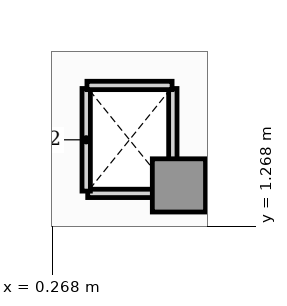
"""IFC4 building model, lengths in metres.
Left out: names, types, materials, properties, quantities, classifications, styles, units other than length and angle.
Written with IfcOpenShell. Run it as: python <this file> out.ifc"""

import sys

from ifc_helpers import new_model, si_unit, direction, frame, frame_2d, origin, origin_2d, place, context, subcontext, project, spatial, rectangle, hollow_rectangle, extrude, element, save


model = new_model("IFC4")
c1 = context("Model", 3, precision=1e-05, world=origin(), true_north=direction((0.0, 1.0)))
c2 = subcontext(c1, "Body", "Model", "MODEL_VIEW")
j1 = project(units=[si_unit("LENGTHUNIT", "METRE"), si_unit("PLANEANGLEUNIT", "RADIAN")], contexts=[c1])
p1 = place(None, origin())
s1 = spatial("IfcSite", under=j1, at=p1, CompositionType="ELEMENT")
p2 = place(p1, origin())
s2 = spatial("IfcBuilding", under=s1, at=p2, CompositionType="ELEMENT")
p3 = place(p2, frame((0.0, 0.0, 24.6)))
s3 = spatial("IfcBuildingStorey", under=s2, at=p3, CompositionType="ELEMENT", Elevation=24.6)
p4 = place(p3, frame((3.6, 2.35, 0.0), z_axis=(0.0, 0.0, 1.0), x_axis=(1.0, 0.0, 0.0)))
e1 = element("IfcColumn", 1, at=p4, inside=s3, PredefinedType="USERDEFINED", context=c2, shape_type="SweptSolid", body=[
    extrude(hollow_rectangle(XDim=1.4, YDim=1.4, WallThickness=0.08, at=origin_2d()), origin(), (0.0, 0.0, 1.0), 5.2),
])
p5 = place(p3, frame((1.2, 2.14, 0.0), z_axis=(0.0, 0.0, 1.0), x_axis=(1.0, 0.0, 0.0)))
e2 = element("IfcWall", 2, at=p5, inside=s3, PredefinedType="SOLIDWALL", context=c2, shape_type="SweptSolid", body=[
    extrude(rectangle(XDim=2.2, YDim=0.22, at=frame_2d((1.1, 0.0))), origin(), (0.0, 0.0, 1.0), 3.95),
])
p6 = place(p3, frame((1.16, 2.2, 0.0), z_axis=(0.0, 0.0, 1.0), x_axis=(0.0, 1.0, 0.0)))
e3 = element("IfcWall", 3, at=p6, inside=s3, PredefinedType="SOLIDWALL", context=c2, shape_type="SweptSolid", body=[
    extrude(rectangle(XDim=2.7, YDim=0.22, at=frame_2d((1.35, 0.0))), origin(), (0.0, 0.0, 1.0), 4.95),
])
p7 = place(p3, frame((3.44, 2.2, 0.0), z_axis=(0.0, 0.0, 1.0), x_axis=(0.0, 1.0, 0.0)))
e4 = element("IfcWall", 4, at=p7, inside=s3, PredefinedType="SOLIDWALL", context=c2, shape_type="SweptSolid", body=[
    extrude(rectangle(XDim=2.7, YDim=0.22, at=frame_2d((1.35, 0.0))), origin(), (0.0, 0.0, 1.0), 4.417),
])
p8 = place(p3, frame((1.18, 4.98, 0.0), z_axis=(0.0, 0.0, 1.0), x_axis=(1.0, 0.0, 0.0)))
e5 = element("IfcWall", 5, at=p8, inside=s3, PredefinedType="SOLIDWALL", context=c2, shape_type="SweptSolid", body=[
    extrude(rectangle(XDim=2.24, YDim=0.22, at=frame_2d((1.12, 0.0))), origin(), (0.0, 0.0, 1.0), 4.95),
])
save(model, sys.argv[1])
